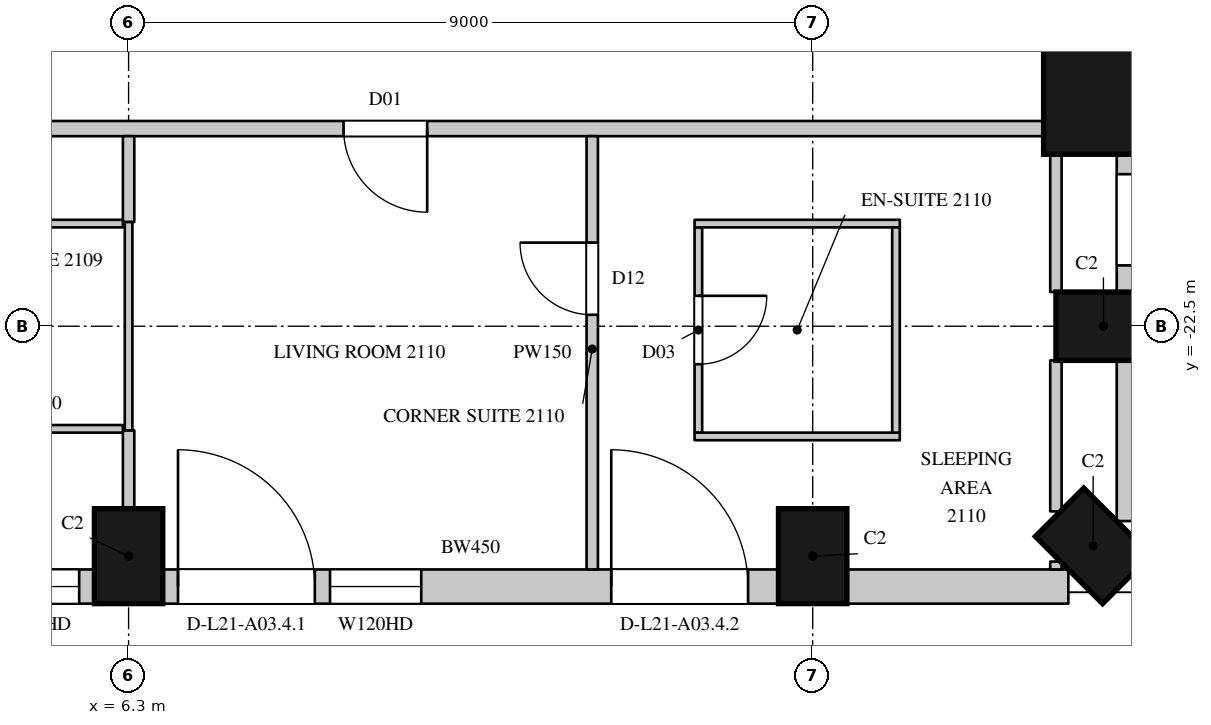
"""IFC4 building model, lengths in metres.
Left out: names, types, materials, properties, quantities, classifications, styles, units other than length and angle.
Written with IfcOpenShell. Run it as: python <this file> out.ifc"""

import sys

from ifc_helpers import new_model, si_unit, direction, frame, frame_2d, origin, origin_2d, place, context, subcontext, project, spatial, rectangle, circle, extrude, element, fill, save


model = new_model("IFC4")
c1 = context("Model", 3, precision=1e-05, world=origin(), true_north=direction((0.0, 1.0)))
c2 = subcontext(c1, "Body", "Model", "MODEL_VIEW")
j1 = project(units=[si_unit("LENGTHUNIT", "METRE"), si_unit("PLANEANGLEUNIT", "RADIAN")], contexts=[c1])
p1 = place(None, origin())
s1 = spatial("IfcSite", under=j1, at=p1, CompositionType="ELEMENT")
p2 = place(p1, origin())
s2 = spatial("IfcBuilding", under=s1, at=p2, CompositionType="ELEMENT")
p3 = place(p2, frame((0.0, 0.0, 105.9)))
s3 = spatial("IfcBuildingStorey", under=s2, at=p3, CompositionType="ELEMENT", Elevation=105.9)
for number, where, z_axis, x_axis in (
    (1, (6.3, -25.525, 0.0), (0.0, 0.0, 1.0), (1.0, 0.0, 0.0)),
    (2, (15.3, -25.525, 0.0), (0.0, 0.0, 1.0), (1.0, 0.0, 0.0)),
    (3, (18.99, -25.39, 0.0), (0.0, 0.0, 1.0), (0.707, 0.707, 0.0)),
    (4, (19.125, -22.5, 0.0), (0.0, 0.0, 1.0), (0.0, 1.0, 0.0)),
):
    element("IfcColumn", number, at=place(p3, frame(where, z_axis=z_axis, x_axis=x_axis)), inside=s3, PredefinedType="COLUMN", context=c2, shape_type="SweptSolid", body=[
        extrude(rectangle(XDim=0.9, YDim=1.25, at=origin_2d()), origin(), (0.0, 0.0, 1.0), 3.6),
    ])
p4 = place(p3, frame((19.088, -19.488, 0.0), z_axis=(0.0, 0.0, 1.0), x_axis=(1.0, 0.0, 0.0)))
e5 = element("IfcColumn", 5, at=p4, inside=s3, PredefinedType="COLUMN", context=c2, shape_type="SweptSolid", body=[
    extrude(circle(Radius=0.75, at=origin_2d()), origin(), (0.0, 0.0, 1.0), 3.6),
])
p5 = place(p3, frame((-2.25, -25.925, 0.0), z_axis=(0.0, 0.0, 1.0), x_axis=(1.0, 0.0, 0.0)))
e6 = element("IfcWall", 6, at=p5, inside=s3, PredefinedType="SOLIDWALL", context=c2, shape_type="SweptSolid", body=[
    extrude(rectangle(XDim=8.1, YDim=0.45, at=frame_2d((4.05, 0.0))), origin(), (0.0, 0.0, 1.0), 3.3),
])
p6 = place(p5, frame((0.2, 0.0, 0.0)))
e7 = element("IfcOpeningElement", 7, at=p6, cuts=e6, PredefinedType="OPENING", context=c2, shape_type="SweptSolid", body=[
    extrude(rectangle(XDim=1.8, YDim=2.4, at=frame_2d((0.9, 1.2))), frame((0.0, 0.235, 0.0), z_axis=(0.0, -1.0, 0.0), x_axis=(1.0, 0.0, 0.0)), (0.0, 0.0, 1.0), 0.47),
])
p7 = place(p5, frame((2.2, 0.0, 1.05)))
e8 = element("IfcOpeningElement", 8, at=p7, cuts=e6, PredefinedType="OPENING", context=c2, shape_type="SweptSolid", body=[
    extrude(rectangle(XDim=1.2, YDim=2.0, at=frame_2d((0.6, 1.0))), frame((0.0, 0.235, 0.0), z_axis=(0.0, -1.0, 0.0), x_axis=(1.0, 0.0, 0.0)), (0.0, 0.0, 1.0), 0.47),
])
p8 = place(p5, frame((4.7, 0.0, 0.0)))
e9 = element("IfcOpeningElement", 9, at=p8, cuts=e6, PredefinedType="OPENING", context=c2, shape_type="SweptSolid", body=[
    extrude(rectangle(XDim=1.8, YDim=2.4, at=frame_2d((0.9, 1.2))), frame((0.0, 0.235, 0.0), z_axis=(0.0, -1.0, 0.0), x_axis=(1.0, 0.0, 0.0)), (0.0, 0.0, 1.0), 0.47),
])
p9 = place(p5, frame((6.7, 0.0, 1.05)))
e10 = element("IfcOpeningElement", 10, at=p9, cuts=e6, PredefinedType="OPENING", context=c2, shape_type="SweptSolid", body=[
    extrude(rectangle(XDim=1.2, YDim=2.0, at=frame_2d((0.6, 1.0))), frame((0.0, 0.235, 0.0), z_axis=(0.0, -1.0, 0.0), x_axis=(1.0, 0.0, 0.0)), (0.0, 0.0, 1.0), 0.47),
])
p10 = place(p3, frame((6.75, -25.925, 0.0), z_axis=(0.0, 0.0, 1.0), x_axis=(1.0, 0.0, 0.0)))
e11 = element("IfcWall", 11, at=p10, inside=s3, PredefinedType="SOLIDWALL", context=c2, shape_type="SweptSolid", body=[
    extrude(rectangle(XDim=8.1, YDim=0.45, at=frame_2d((4.05, 0.0))), origin(), (0.0, 0.0, 1.0), 3.3),
])
p11 = place(p10, frame((0.2, 0.0, 0.0)))
e12 = element("IfcOpeningElement", 12, at=p11, cuts=e11, PredefinedType="OPENING", context=c2, shape_type="SweptSolid", body=[
    extrude(rectangle(XDim=1.8, YDim=2.4, at=frame_2d((0.9, 1.2))), frame((0.0, 0.235, 0.0), z_axis=(0.0, -1.0, 0.0), x_axis=(1.0, 0.0, 0.0)), (0.0, 0.0, 1.0), 0.47),
])
p12 = place(p10, frame((2.2, 0.0, 1.05)))
e13 = element("IfcOpeningElement", 13, at=p12, cuts=e11, PredefinedType="OPENING", context=c2, shape_type="SweptSolid", body=[
    extrude(rectangle(XDim=1.2, YDim=2.0, at=frame_2d((0.6, 1.0))), frame((0.0, 0.235, 0.0), z_axis=(0.0, -1.0, 0.0), x_axis=(1.0, 0.0, 0.0)), (0.0, 0.0, 1.0), 0.47),
])
p13 = place(p10, frame((5.9, 0.0, 0.0)))
e14 = element("IfcOpeningElement", 14, at=p13, cuts=e11, PredefinedType="OPENING", context=c2, shape_type="SweptSolid", body=[
    extrude(rectangle(XDim=1.8, YDim=2.4, at=frame_2d((0.9, 1.2))), frame((0.0, 0.235, 0.0), z_axis=(0.0, -1.0, 0.0), x_axis=(1.0, 0.0, 0.0)), (0.0, 0.0, 1.0), 0.47),
])
p14 = place(p3, frame((15.75, -25.925, 0.0), z_axis=(0.0, 0.0, 1.0), x_axis=(1.0, 0.0, 0.0)))
e15 = element("IfcWall", 15, at=p14, inside=s3, PredefinedType="SOLIDWALL", context=c2, shape_type="SweptSolid", body=[
    extrude(rectangle(XDim=2.914, YDim=0.45, at=frame_2d((1.457, 0.0))), origin(), (0.0, 0.0, 1.0), 3.3),
])
p15 = place(p3, frame((19.525, -25.064, 0.0), z_axis=(0.0, 0.0, 1.0), x_axis=(0.0, 1.0, 0.0)))
e16 = element("IfcWall", 16, at=p15, inside=s3, PredefinedType="SOLIDWALL", context=c2, shape_type="SweptSolid", body=[
    extrude(rectangle(XDim=2.114, YDim=0.45, at=frame_2d((1.057, 0.0))), origin(), (0.0, 0.0, 1.0), 3.3),
])
p16 = place(p3, frame((19.525, -22.05, 0.0), z_axis=(0.0, 0.0, 1.0), x_axis=(0.0, 1.0, 0.0)))
e17 = element("IfcWall", 17, at=p16, inside=s3, PredefinedType="SOLIDWALL", context=c2, shape_type="SweptSolid", body=[
    extrude(rectangle(XDim=1.843, YDim=0.45, at=frame_2d((0.921, 0.0))), origin(), (0.0, 0.0, 1.0), 3.3),
])
p17 = place(p16, frame((0.35, 0.0, 1.05)))
e18 = element("IfcOpeningElement", 18, at=p17, cuts=e17, PredefinedType="OPENING", context=c2, shape_type="SweptSolid", body=[
    extrude(rectangle(XDim=1.2, YDim=2.0, at=frame_2d((0.6, 1.0))), frame((0.0, 0.235, 0.0), z_axis=(0.0, -1.0, 0.0), x_axis=(1.0, 0.0, 0.0)), (0.0, 0.0, 1.0), 0.47),
])
p18 = place(p3, frame((-23.822, -19.9, 0.0), z_axis=(0.0, 0.0, 1.0), x_axis=(1.0, 0.0, 0.0)))
e19 = element("IfcWall", 19, at=p18, inside=s3, PredefinedType="PARTITIONING", context=c2, shape_type="SweptSolid", body=[
    extrude(rectangle(XDim=42.222, YDim=0.2, at=frame_2d((21.111, 0.0))), origin(), (0.0, 0.0, 1.0), 3.3),
])
p19 = place(p18, frame((6.25, 0.0, 0.0)))
e20 = element("IfcOpeningElement", 20, at=p19, cuts=e19, PredefinedType="OPENING", context=c2, shape_type="SweptSolid", body=[
    extrude(rectangle(XDim=0.95, YDim=2.2, at=frame_2d((0.475, 1.1))), frame((0.0, 0.11, 0.0), z_axis=(0.0, -1.0, 0.0), x_axis=(1.0, 0.0, 0.0)), (0.0, 0.0, 1.0), 0.22),
])
p20 = place(p18, frame((14.15, 0.0, 0.0)))
e21 = element("IfcOpeningElement", 21, at=p20, cuts=e19, PredefinedType="OPENING", context=c2, shape_type="SweptSolid", body=[
    extrude(rectangle(XDim=1.1, YDim=2.4, at=frame_2d((0.55, 1.2))), frame((0.0, 0.11, 0.0), z_axis=(0.0, -1.0, 0.0), x_axis=(1.0, 0.0, 0.0)), (0.0, 0.0, 1.0), 0.22),
])
p21 = place(p18, frame((24.25, 0.0, 0.0)))
e22 = element("IfcOpeningElement", 22, at=p21, cuts=e19, PredefinedType="OPENING", context=c2, shape_type="SweptSolid", body=[
    extrude(rectangle(XDim=0.95, YDim=2.2, at=frame_2d((0.475, 1.1))), frame((0.0, 0.11, 0.0), z_axis=(0.0, -1.0, 0.0), x_axis=(1.0, 0.0, 0.0)), (0.0, 0.0, 1.0), 0.22),
])
p22 = place(p18, frame((32.95, 0.0, 0.0)))
e23 = element("IfcOpeningElement", 23, at=p22, cuts=e19, PredefinedType="OPENING", context=c2, shape_type="SweptSolid", body=[
    extrude(rectangle(XDim=1.1, YDim=2.4, at=frame_2d((0.55, 1.2))), frame((0.0, 0.11, 0.0), z_axis=(0.0, -1.0, 0.0), x_axis=(1.0, 0.0, 0.0)), (0.0, 0.0, 1.0), 0.22),
])
p23 = place(p3, frame((18.5, -18.938, 0.0), z_axis=(0.0, 0.0, 1.0), x_axis=(0.0, 1.0, 0.0)))
e24 = element("IfcWall", 24, at=p23, inside=s3, PredefinedType="PARTITIONING", context=c2, shape_type="SweptSolid", body=[
    extrude(rectangle(XDim=14.188, YDim=0.2, at=frame_2d((7.094, 0.0))), origin(), (0.0, 0.0, 1.0), 3.3),
])
p24 = place(p23, frame((3.45, 0.0, 0.0)))
e25 = element("IfcOpeningElement", 25, at=p24, cuts=e24, PredefinedType="OPENING", context=c2, shape_type="SweptSolid", body=[
    extrude(rectangle(XDim=0.95, YDim=2.2, at=frame_2d((0.475, 1.1))), frame((0.0, 0.11, 0.0), z_axis=(0.0, -1.0, 0.0), x_axis=(1.0, 0.0, 0.0)), (0.0, 0.0, 1.0), 0.22),
])
p25 = place(p23, frame((12.85, 0.0, 0.0)))
e26 = element("IfcOpeningElement", 26, at=p25, cuts=e24, PredefinedType="OPENING", context=c2, shape_type="SweptSolid", body=[
    extrude(rectangle(XDim=0.95, YDim=2.2, at=frame_2d((0.475, 1.1))), frame((0.0, 0.11, 0.0), z_axis=(0.0, -1.0, 0.0), x_axis=(1.0, 0.0, 0.0)), (0.0, 0.0, 1.0), 0.22),
])
p26 = place(p3, frame((6.3, -24.9, 0.0), z_axis=(0.0, 0.0, 1.0), x_axis=(0.0, 1.0, 0.0)))
e27 = element("IfcWall", 27, at=p26, inside=s3, PredefinedType="PARTITIONING", context=c2, shape_type="SweptSolid", body=[
    extrude(rectangle(XDim=1.03, YDim=0.15, at=frame_2d((0.515, 0.0))), origin(), (0.0, 0.0, 1.0), 2.75),
])
p27 = place(p3, frame((6.3, -21.13, 0.0), z_axis=(0.0, 0.0, 1.0), x_axis=(0.0, 1.0, 0.0)))
e28 = element("IfcWall", 28, at=p27, inside=s3, PredefinedType="PARTITIONING", context=c2, shape_type="SweptSolid", body=[
    extrude(rectangle(XDim=1.13, YDim=0.15, at=frame_2d((0.565, 0.0))), origin(), (0.0, 0.0, 1.0), 2.75),
])
p28 = place(p3, frame((12.4, -25.7, 0.0), z_axis=(0.0, 0.0, 1.0), x_axis=(0.0, 1.0, 0.0)))
e29 = element("IfcWall", 29, at=p28, inside=s3, PredefinedType="PARTITIONING", context=c2, shape_type="SweptSolid", body=[
    extrude(rectangle(XDim=5.7, YDim=0.15, at=frame_2d((2.85, 0.0))), origin(), (0.0, 0.0, 1.0), 3.3),
])
p29 = place(p28, frame((3.35, 0.0, 0.0)))
e30 = element("IfcOpeningElement", 30, at=p29, cuts=e29, PredefinedType="OPENING", context=c2, shape_type="SweptSolid", body=[
    extrude(rectangle(XDim=0.95, YDim=2.2, at=frame_2d((0.475, 1.1))), frame((0.0, 0.085, 0.0), z_axis=(0.0, -1.0, 0.0), x_axis=(1.0, 0.0, 0.0)), (0.0, 0.0, 1.0), 0.17),
])
p30 = place(p3, frame((18.5, -25.7, 0.0), z_axis=(0.0, 0.0, 1.0), x_axis=(0.0, 1.0, 0.0)))
e31 = element("IfcWall", 31, at=p30, inside=s3, PredefinedType="PARTITIONING", context=c2, shape_type="SweptSolid", body=[
    extrude(rectangle(XDim=0.104, YDim=0.15, at=frame_2d((0.052, 0.0))), origin(), (0.0, 0.0, 1.0), 3.3),
])
p31 = place(p3, frame((18.5, -24.936, 0.0), z_axis=(0.0, 0.0, 1.0), x_axis=(0.0, 1.0, 0.0)))
e32 = element("IfcWall", 32, at=p31, inside=s3, PredefinedType="PARTITIONING", context=c2, shape_type="SweptSolid", body=[
    extrude(rectangle(XDim=1.986, YDim=0.15, at=frame_2d((0.993, 0.0))), origin(), (0.0, 0.0, 1.0), 3.3),
])
p32 = place(p3, frame((18.5, -22.05, 0.0), z_axis=(0.0, 0.0, 1.0), x_axis=(0.0, 1.0, 0.0)))
e33 = element("IfcWall", 33, at=p32, inside=s3, PredefinedType="PARTITIONING", context=c2, shape_type="SweptSolid", body=[
    extrude(rectangle(XDim=2.032, YDim=0.15, at=frame_2d((1.016, 0.0))), origin(), (0.0, 0.0, 1.0), 3.3),
])
for number, where, z_axis, x_axis in (
    (34, (3.854, -23.85, 0.0), (0.0, 0.0, 1.0), (1.0, 0.0, 0.0)),
    (35, (3.854, -21.15, 0.0), (0.0, 0.0, 1.0), (1.0, 0.0, 0.0)),
):
    element("IfcWall", number, at=place(p3, frame(where, z_axis=z_axis, x_axis=x_axis)), inside=s3, PredefinedType="PARTITIONING", context=c2, shape_type="SweptSolid", body=[
        extrude(rectangle(XDim=2.371, YDim=0.1, at=frame_2d((1.186, 0.0))), origin(), (0.0, 0.0, 1.0), 3.3),
    ])
p33 = place(p3, frame((6.3, -23.87, 0.0), z_axis=(0.0, 0.0, 1.0), x_axis=(0.0, 1.0, 0.0)))
e36 = element("IfcWall", 36, at=p33, inside=s3, PredefinedType="PARTITIONING", context=c2, shape_type="SweptSolid", body=[
    extrude(rectangle(XDim=2.74, YDim=0.1, at=frame_2d((1.37, 0.0))), origin(), (0.0, 0.0, 1.0), 2.75),
])
p34 = place(p3, frame((13.796, -23.9, 0.0), z_axis=(0.0, 0.0, 1.0), x_axis=(0.0, 1.0, 0.0)))
e37 = element("IfcWall", 37, at=p34, inside=s3, PredefinedType="PARTITIONING", context=c2, shape_type="SweptSolid", body=[
    extrude(rectangle(XDim=2.7, YDim=0.1, at=frame_2d((1.35, 0.0))), origin(), (0.0, 0.0, 1.0), 3.3),
])
p35 = place(p34, frame((0.9, 0.0, 0.0)))
e38 = element("IfcOpeningElement", 38, at=p35, cuts=e37, PredefinedType="OPENING", context=c2, shape_type="SweptSolid", body=[
    extrude(rectangle(XDim=0.9, YDim=2.2, at=frame_2d((0.45, 1.1))), frame((0.0, 0.06, 0.0), z_axis=(0.0, -1.0, 0.0), x_axis=(1.0, 0.0, 0.0)), (0.0, 0.0, 1.0), 0.12),
])
for number, where, z_axis, x_axis in (
    (39, (13.746, -23.95, 0.0), (0.0, 0.0, 1.0), (1.0, 0.0, 0.0)),
    (40, (13.746, -21.15, 0.0), (0.0, 0.0, 1.0), (1.0, 0.0, 0.0)),
    (41, (16.396, -23.9, 0.0), (0.0, 0.0, 1.0), (0.0, 1.0, 0.0)),
):
    element("IfcWall", number, at=place(p3, frame(where, z_axis=z_axis, x_axis=x_axis)), inside=s3, PredefinedType="PARTITIONING", context=c2, shape_type="SweptSolid", body=[
        extrude(rectangle(XDim=2.7, YDim=0.1, at=frame_2d((1.35, 0.0))), origin(), (0.0, 0.0, 1.0), 3.3),
    ])
p36 = place(p9, origin())
e42 = element("IfcWindow", 42, at=p36, inside=s3, PartitioningType="SINGLE_PANEL", PredefinedType="WINDOW", context=c2, shape_type="SweptSolid", body=[
    extrude(rectangle(XDim=1.2, YDim=2.0, at=frame_2d((0.6, 1.0))), frame((0.0, 0.135, 0.0), z_axis=(0.0, -1.0, 0.0), x_axis=(1.0, 0.0, 0.0)), (0.0, 0.0, 1.0), 0.06),
])
fill(e10, e42)
p37 = place(p11, origin())
e43 = element("IfcDoor", 43, at=p37, inside=s3, OperationType="SLIDING_TO_LEFT", PredefinedType="DOOR", context=c2, shape_type="SweptSolid", body=[
    extrude(rectangle(XDim=1.8, YDim=2.4, at=frame_2d((0.9, 1.2))), frame((0.0, 0.13, 0.0), z_axis=(0.0, -1.0, 0.0), x_axis=(1.0, 0.0, 0.0)), (0.0, 0.0, 1.0), 0.05),
])
fill(e12, e43)
p38 = place(p12, origin())
e44 = element("IfcWindow", 44, at=p38, inside=s3, PartitioningType="SINGLE_PANEL", PredefinedType="WINDOW", context=c2, shape_type="SweptSolid", body=[
    extrude(rectangle(XDim=1.2, YDim=2.0, at=frame_2d((0.6, 1.0))), frame((0.0, 0.135, 0.0), z_axis=(0.0, -1.0, 0.0), x_axis=(1.0, 0.0, 0.0)), (0.0, 0.0, 1.0), 0.06),
])
fill(e13, e44)
p39 = place(p13, origin())
e45 = element("IfcDoor", 45, at=p39, inside=s3, OperationType="SLIDING_TO_LEFT", PredefinedType="DOOR", context=c2, shape_type="SweptSolid", body=[
    extrude(rectangle(XDim=1.8, YDim=2.4, at=frame_2d((0.9, 1.2))), frame((0.0, 0.13, 0.0), z_axis=(0.0, -1.0, 0.0), x_axis=(1.0, 0.0, 0.0)), (0.0, 0.0, 1.0), 0.05),
])
fill(e14, e45)
p40 = place(p17, origin())
e46 = element("IfcWindow", 46, at=p40, inside=s3, PartitioningType="SINGLE_PANEL", PredefinedType="WINDOW", context=c2, shape_type="SweptSolid", body=[
    extrude(rectangle(XDim=1.2, YDim=2.0, at=frame_2d((0.6, 1.0))), frame((0.0, 0.135, 0.0), z_axis=(0.0, -1.0, 0.0), x_axis=(1.0, 0.0, 0.0)), (0.0, 0.0, 1.0), 0.06),
])
fill(e18, e46)
p41 = place(p22, origin())
e47 = element("IfcDoor", 47, at=p41, inside=s3, OperationType="SINGLE_SWING_LEFT", PredefinedType="DOOR", context=c2, shape_type="SweptSolid", body=[
    extrude(rectangle(XDim=1.1, YDim=2.4, at=frame_2d((0.55, 1.2))), frame((0.0, 0.025, 0.0), z_axis=(0.0, -1.0, 0.0), x_axis=(1.0, 0.0, 0.0)), (0.0, 0.0, 1.0), 0.05),
])
fill(e23, e47)
p42 = place(p29, origin())
e48 = element("IfcDoor", 48, at=p42, inside=s3, OperationType="SINGLE_SWING_RIGHT", PredefinedType="DOOR", context=c2, shape_type="SweptSolid", body=[
    extrude(rectangle(XDim=0.95, YDim=2.2, at=frame_2d((0.475, 1.1))), frame((0.0, 0.025, 0.0), z_axis=(0.0, -1.0, 0.0), x_axis=(1.0, 0.0, 0.0)), (0.0, 0.0, 1.0), 0.05),
])
fill(e30, e48)
p43 = place(p35, origin())
e49 = element("IfcDoor", 49, at=p43, inside=s3, OperationType="SINGLE_SWING_LEFT", PredefinedType="DOOR", context=c2, shape_type="SweptSolid", body=[
    extrude(rectangle(XDim=0.9, YDim=2.2, at=frame_2d((0.45, 1.1))), frame((0.0, 0.025, 0.0), z_axis=(0.0, -1.0, 0.0), x_axis=(1.0, 0.0, 0.0)), (0.0, 0.0, 1.0), 0.05),
])
fill(e38, e49)
save(model, sys.argv[1])
